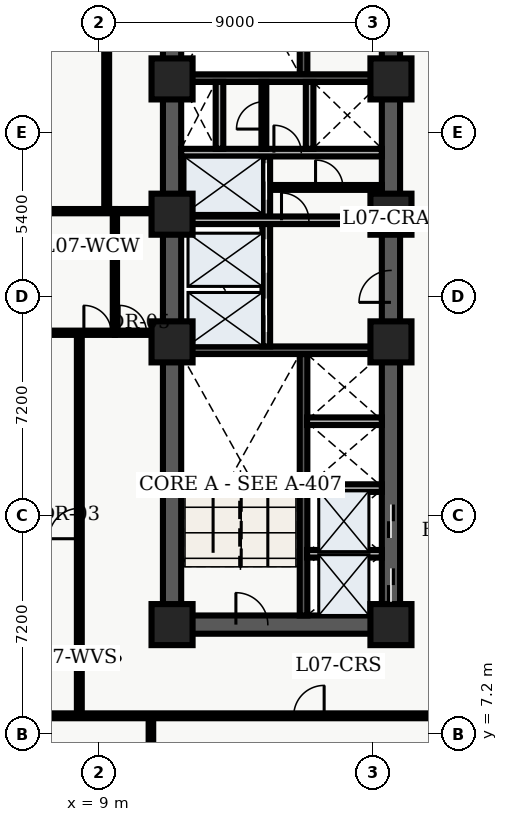
"""IFC4 building model, lengths in metres.
Left out: names, types, materials, properties, quantities, classifications, styles, units other than length and angle.
Written with IfcOpenShell. Run it as: python <this file> out.ifc"""

import sys

from ifc_helpers import new_model, entity, si_unit, converted_unit, direction, frame, origin_with_axes, origin_2d_with_axis, place, context, subcontext, project, spatial, polyline, rectangle, outline, extrude, element, fill, save


model = new_model("IFC4")
c1 = context("Model", 3, precision=1e-05, world=origin_with_axes(), true_north=direction((0.0, 1.0)))
c2 = subcontext(c1, "Body", "Model", "MODEL_VIEW")
j1 = project(units=[si_unit("LENGTHUNIT", "METRE"), converted_unit("PLANEANGLEUNIT", "DEGREE", entity("IfcPlaneAngleMeasure", 0.017), si_unit("PLANEANGLEUNIT", "RADIAN"), dimensions=[0, 0, 0, 0, 0, 0, 0])], contexts=[c1])
p1 = place(None, origin_with_axes())
s1 = spatial("IfcSite", under=j1, at=p1, CompositionType="ELEMENT")
p2 = place(p1, origin_with_axes())
s2 = spatial("IfcBuilding", under=s1, at=p2, CompositionType="ELEMENT")
p3 = place(p2, frame((0.0, 0.0, 32.7), z_axis=(0.0, 0.0, 1.0), x_axis=(1.0, 0.0, 0.0)))
s3 = spatial("IfcBuildingStorey", under=s2, at=p3, CompositionType="ELEMENT", Elevation=32.7)
p4 = place(p3, frame((11.4, 10.8, 0.0), z_axis=(0.0, 0.0, 1.0), x_axis=(0.0, 1.0, 0.0)))
e1 = element("IfcWall", 1, at=p4, inside=s3, PredefinedType="SHEAR", context=c2, shape_type="SweptSolid", body=[
    extrude(outline(polyline([(0.0, -0.3), (27.0, -0.3), (27.0, 0.3), (0.0, 0.3), (0.0, -0.3)])), origin_with_axes(), (0.0, 0.0, 1.0), 3.66),
])
p5 = place(p3, frame((11.4, 10.8, 0.0), z_axis=(0.0, 0.0, 1.0), x_axis=(1.0, 0.0, 0.0)))
e2 = element("IfcWall", 2, at=p5, inside=s3, PredefinedType="SHEAR", context=c2, shape_type="SweptSolid", body=[
    extrude(outline(polyline([(0.0, -0.3), (7.2, -0.3), (7.2, 0.3), (0.0, 0.3), (0.0, -0.3)])), origin_with_axes(), (0.0, 0.0, 1.0), 3.66),
])
p6 = place(p5, frame((2.625, 0.0, 0.0), z_axis=(0.0, 0.0, 1.0), x_axis=(1.0, 0.0, 0.0)))
e3 = element("IfcOpeningElement", 3, at=p6, cuts=e2, PredefinedType="OPENING", context=c2, shape_type="SweptSolid", body=[
    extrude(rectangle(XDim=1.05, YDim=0.62, at=origin_2d_with_axis()), origin_with_axes(), (0.0, 0.0, 1.0), 2.15),
])
p7 = place(p3, frame((18.6, 10.8, 0.0), z_axis=(0.0, 0.0, 1.0), x_axis=(0.0, 1.0, 0.0)))
e4 = element("IfcWall", 4, at=p7, inside=s3, PredefinedType="SHEAR", context=c2, shape_type="SweptSolid", body=[
    extrude(outline(polyline([(0.0, -0.3), (13.5, -0.3), (13.5, 0.3), (0.0, 0.3), (0.0, -0.3)])), origin_with_axes(), (0.0, 0.0, 1.0), 3.66),
])
p8 = place(p7, frame((1.3, 0.0, 0.0), z_axis=(0.0, 0.0, 1.0), x_axis=(1.0, 0.0, 0.0)))
e5 = element("IfcOpeningElement", 5, at=p8, cuts=e4, PredefinedType="OPENING", context=c2, shape_type="SweptSolid", body=[
    extrude(rectangle(XDim=1.1, YDim=0.62, at=origin_2d_with_axis()), origin_with_axes(), (0.0, 0.0, 1.0), 2.15),
])
p9 = place(p7, frame((3.4, 0.0, 0.0), z_axis=(0.0, 0.0, 1.0), x_axis=(1.0, 0.0, 0.0)))
e6 = element("IfcOpeningElement", 6, at=p9, cuts=e4, PredefinedType="OPENING", context=c2, shape_type="SweptSolid", body=[
    extrude(rectangle(XDim=1.1, YDim=0.62, at=origin_2d_with_axis()), origin_with_axes(), (0.0, 0.0, 1.0), 2.15),
])
p10 = place(p7, frame((11.125, 0.0, 0.0), z_axis=(0.0, 0.0, 1.0), x_axis=(1.0, 0.0, 0.0)))
e7 = element("IfcOpeningElement", 7, at=p10, cuts=e4, PredefinedType="OPENING", context=c2, shape_type="SweptSolid", body=[
    extrude(rectangle(XDim=1.05, YDim=0.62, at=origin_2d_with_axis()), origin_with_axes(), (0.0, 0.0, 1.0), 2.15),
])
p11 = place(p3, frame((18.6, 24.3, 0.0), z_axis=(0.0, 0.0, 1.0), x_axis=(0.0, 1.0, 0.0)))
e8 = element("IfcWall", 8, at=p11, inside=s3, PredefinedType="SHEAR", context=c2, shape_type="SweptSolid", body=[
    extrude(outline(polyline([(0.0, -0.3), (13.5, -0.3), (13.5, 0.3), (0.0, 0.3), (0.0, -0.3)])), origin_with_axes(), (0.0, 0.0, 1.0), 3.66),
])
p12 = place(p11, frame((6.025, 0.0, 0.0), z_axis=(0.0, 0.0, 1.0), x_axis=(1.0, 0.0, 0.0)))
e9 = element("IfcOpeningElement", 9, at=p12, cuts=e8, PredefinedType="OPENING", context=c2, shape_type="SweptSolid", body=[
    extrude(rectangle(XDim=0.95, YDim=0.62, at=origin_2d_with_axis()), origin_with_axes(), (0.0, 0.0, 1.0), 2.15),
])
p13 = place(p11, frame((7.825, 0.0, 0.0), z_axis=(0.0, 0.0, 1.0), x_axis=(1.0, 0.0, 0.0)))
e10 = element("IfcOpeningElement", 10, at=p13, cuts=e8, PredefinedType="OPENING", context=c2, shape_type="SweptSolid", body=[
    extrude(rectangle(XDim=0.95, YDim=0.62, at=origin_2d_with_axis()), origin_with_axes(), (0.0, 0.0, 1.0), 2.15),
])
p14 = place(p3, frame((15.725, 11.1, 0.0), z_axis=(0.0, 0.0, 1.0), x_axis=(0.0, 1.0, 0.0)))
e11 = element("IfcWall", 11, at=p14, inside=s3, PredefinedType="SHEAR", context=c2, shape_type="SweptSolid", body=[
    extrude(outline(polyline([(0.0, -0.125), (8.6, -0.125), (8.6, 0.125), (0.0, 0.125), (0.0, -0.125)])), origin_with_axes(), (0.0, 0.0, 1.0), 3.66),
])
p15 = place(p3, frame((11.7, 19.825, 0.0), z_axis=(0.0, 0.0, 1.0), x_axis=(1.0, 0.0, 0.0)))
e12 = element("IfcWall", 12, at=p15, inside=s3, PredefinedType="SHEAR", context=c2, shape_type="SweptSolid", body=[
    extrude(outline(polyline([(0.0, -0.125), (6.6, -0.125), (6.6, 0.125), (0.0, 0.125), (0.0, -0.125)])), origin_with_axes(), (0.0, 0.0, 1.0), 3.66),
])
p16 = place(p3, frame((15.725, 28.9, 0.0), z_axis=(0.0, 0.0, 1.0), x_axis=(0.0, 1.0, 0.0)))
e13 = element("IfcWall", 13, at=p16, inside=s3, PredefinedType="SHEAR", context=c2, shape_type="SweptSolid", body=[
    extrude(outline(polyline([(0.0, -0.125), (8.6, -0.125), (8.6, 0.125), (0.0, 0.125), (0.0, -0.125)])), origin_with_axes(), (0.0, 0.0, 1.0), 3.66),
])
p17 = place(p3, frame((11.7, 28.775, 0.0), z_axis=(0.0, 0.0, 1.0), x_axis=(1.0, 0.0, 0.0)))
e14 = element("IfcWall", 14, at=p17, inside=s3, PredefinedType="SHEAR", context=c2, shape_type="SweptSolid", body=[
    extrude(outline(polyline([(0.0, -0.125), (6.6, -0.125), (6.6, 0.125), (0.0, 0.125), (0.0, -0.125)])), origin_with_axes(), (0.0, 0.0, 1.0), 3.66),
])
p18 = place(p3, frame((14.5, 19.95, 0.0), z_axis=(0.0, 0.0, 1.0), x_axis=(0.0, 1.0, 0.0)))
e15 = element("IfcWall", 15, at=p18, inside=s3, PredefinedType="SOLIDWALL", context=c2, shape_type="SweptSolid", body=[
    extrude(outline(polyline([(0.0, -0.125), (6.25, -0.125), (6.25, 0.125), (0.0, 0.125), (0.0, -0.125)])), origin_with_axes(), (0.0, 0.0, 1.0), 2.7),
])
p19 = place(p18, frame((1.025, 0.0, 0.0), z_axis=(0.0, 0.0, 1.0), x_axis=(1.0, 0.0, 0.0)))
e16 = element("IfcOpeningElement", 16, at=p19, cuts=e15, PredefinedType="OPENING", context=c2, shape_type="SweptSolid", body=[
    extrude(rectangle(XDim=1.1, YDim=0.27, at=origin_2d_with_axis()), origin_with_axes(), (0.0, 0.0, 1.0), 2.15),
])
p20 = place(p18, frame((2.975, 0.0, 0.0), z_axis=(0.0, 0.0, 1.0), x_axis=(1.0, 0.0, 0.0)))
e17 = element("IfcOpeningElement", 17, at=p20, cuts=e15, PredefinedType="OPENING", context=c2, shape_type="SweptSolid", body=[
    extrude(rectangle(XDim=1.1, YDim=0.27, at=origin_2d_with_axis()), origin_with_axes(), (0.0, 0.0, 1.0), 2.15),
])
p21 = place(p18, frame((5.425, 0.0, 0.0), z_axis=(0.0, 0.0, 1.0), x_axis=(1.0, 0.0, 0.0)))
e18 = element("IfcOpeningElement", 18, at=p21, cuts=e15, PredefinedType="OPENING", context=c2, shape_type="SweptSolid", body=[
    extrude(rectangle(XDim=1.2, YDim=0.27, at=origin_2d_with_axis()), origin_with_axes(), (0.0, 0.0, 1.0), 2.15),
])
p22 = place(p3, frame((11.7, 24.1, 0.0), z_axis=(0.0, 0.0, 1.0), x_axis=(1.0, 0.0, 0.0)))
e19 = element("IfcWall", 19, at=p22, inside=s3, PredefinedType="SOLIDWALL", context=c2, shape_type="SweptSolid", body=[
    extrude(outline(polyline([(0.0, -0.125), (6.6, -0.125), (6.6, 0.125), (0.0, 0.125), (0.0, -0.125)])), origin_with_axes(), (0.0, 0.0, 1.0), 2.7),
])
p23 = place(p22, frame((3.75, 0.0, 0.0), z_axis=(0.0, 0.0, 1.0), x_axis=(1.0, 0.0, 0.0)))
e20 = element("IfcOpeningElement", 20, at=p23, cuts=e19, PredefinedType="OPENING", context=c2, shape_type="SweptSolid", body=[
    extrude(rectangle(XDim=0.9, YDim=0.27, at=origin_2d_with_axis()), origin_with_axes(), (0.0, 0.0, 1.0), 2.15),
])
p24 = place(p3, frame((11.7, 26.325, 0.0), z_axis=(0.0, 0.0, 1.0), x_axis=(1.0, 0.0, 0.0)))
e21 = element("IfcWall", 21, at=p24, inside=s3, PredefinedType="SOLIDWALL", context=c2, shape_type="SweptSolid", body=[
    extrude(outline(polyline([(0.0, -0.125), (6.6, -0.125), (6.6, 0.125), (0.0, 0.125), (0.0, -0.125)])), origin_with_axes(), (0.0, 0.0, 1.0), 2.7),
])
p25 = place(p24, frame((3.5, 0.0, 0.0), z_axis=(0.0, 0.0, 1.0), x_axis=(1.0, 0.0, 0.0)))
e22 = element("IfcOpeningElement", 22, at=p25, cuts=e21, PredefinedType="OPENING", context=c2, shape_type="SweptSolid", body=[
    extrude(rectangle(XDim=0.9, YDim=0.27, at=origin_2d_with_axis()), origin_with_axes(), (0.0, 0.0, 1.0), 2.15),
])
for number, where, z_axis, x_axis in (
    (23, (12.96, 26.45, 0.0), (0.0, 0.0, 1.0), (0.0, 1.0, 0.0)),
    (24, (15.925, 26.45, 0.0), (0.0, 0.0, 1.0), (0.0, 1.0, 0.0)),
):
    element("IfcWall", number, at=place(p3, frame(where, z_axis=z_axis, x_axis=x_axis)), inside=s3, PredefinedType="SOLIDWALL", context=c2, shape_type="SweptSolid", body=[
        extrude(outline(polyline([(0.0, -0.125), (2.2, -0.125), (2.2, 0.125), (0.0, 0.125), (0.0, -0.125)])), origin_with_axes(), (0.0, 0.0, 1.0), 2.7),
    ])
for number, where, z_axis, x_axis in (
    (25, (11.4, 10.8, 0.0), (0.0, 0.0, 1.0), (1.0, 0.0, 0.0)),
    (26, (11.4, 20.1, 0.0), (0.0, 0.0, 1.0), (1.0, 0.0, 0.0)),
    (27, (11.4, 24.3, 0.0), (0.0, 0.0, 1.0), (1.0, 0.0, 0.0)),
    (28, (11.4, 28.75, 0.0), (0.0, 0.0, 1.0), (1.0, 0.0, 0.0)),
    (29, (18.6, 10.8, 0.0), (0.0, 0.0, 1.0), (1.0, 0.0, 0.0)),
    (30, (18.6, 20.1, 0.0), (0.0, 0.0, 1.0), (1.0, 0.0, 0.0)),
    (31, (18.6, 24.3, 0.0), (0.0, 0.0, 1.0), (1.0, 0.0, 0.0)),
    (32, (18.6, 28.75, 0.0), (0.0, 0.0, 1.0), (1.0, 0.0, 0.0)),
):
    element("IfcColumn", number, at=place(p3, frame(where, z_axis=z_axis, x_axis=x_axis)), inside=s3, PredefinedType="COLUMN", context=c2, shape_type="SweptSolid", body=[
        extrude(rectangle(XDim=1.35, YDim=1.35, at=origin_2d_with_axis()), origin_with_axes(), (0.0, 0.0, 1.0), 3.9),
    ])
p26 = place(p3, frame((14.62, 25.18, 0.0), z_axis=(0.0, 0.0, 1.0), x_axis=(1.0, 0.0, 0.0)))
e33 = element("IfcWall", 33, at=p26, inside=s3, PredefinedType="PARTITIONING", context=c2, shape_type="SweptSolid", body=[
    extrude(outline(polyline([(0.0, -0.08), (3.68, -0.08), (3.68, 0.08), (0.0, 0.08), (0.0, -0.08)])), origin_with_axes(), (0.0, 0.0, 1.0), 2.7),
])
p27 = place(p26, frame((1.95, 0.0, 0.0), z_axis=(0.0, 0.0, 1.0), x_axis=(1.0, 0.0, 0.0)))
e34 = element("IfcOpeningElement", 34, at=p27, cuts=e33, PredefinedType="OPENING", context=c2, shape_type="SweptSolid", body=[
    extrude(rectangle(XDim=0.9, YDim=0.18, at=origin_2d_with_axis()), origin_with_axes(), (0.0, 0.0, 1.0), 2.15),
])
p28 = place(p3, frame((14.42, 26.45, 0.0), z_axis=(0.0, 0.0, 1.0), x_axis=(0.0, 1.0, 0.0)))
e35 = element("IfcWall", 35, at=p28, inside=s3, PredefinedType="PARTITIONING", context=c2, shape_type="SweptSolid", body=[
    extrude(outline(polyline([(0.0, -0.08), (2.2, -0.08), (2.2, 0.08), (0.0, 0.08), (0.0, -0.08)])), origin_with_axes(), (0.0, 0.0, 1.0), 2.7),
])
p29 = place(p28, frame((1.1, 0.0, 0.0), z_axis=(0.0, 0.0, 1.0), x_axis=(1.0, 0.0, 0.0)))
e36 = element("IfcOpeningElement", 36, at=p29, cuts=e35, PredefinedType="OPENING", context=c2, shape_type="SweptSolid", body=[
    extrude(rectangle(XDim=0.9, YDim=0.18, at=origin_2d_with_axis()), origin_with_axes(), (0.0, 0.0, 1.0), 2.15),
])
for number, where, z_axis, x_axis in (
    (37, (15.84, 13.13, 0.0), (0.0, 0.0, 1.0), (1.0, 0.0, 0.0)),
    (38, (15.84, 15.29, 0.0), (0.0, 0.0, 1.0), (1.0, 0.0, 0.0)),
    (39, (15.84, 17.49, 0.0), (0.0, 0.0, 1.0), (1.0, 0.0, 0.0)),
):
    element("IfcWall", number, at=place(p3, frame(where, z_axis=z_axis, x_axis=x_axis)), inside=s3, PredefinedType="SOLIDWALL", context=c2, shape_type="SweptSolid", body=[
        extrude(outline(polyline([(0.0, -0.125), (2.46, -0.125), (2.46, 0.125), (0.0, 0.125), (0.0, -0.125)])), origin_with_axes(), (0.0, 0.0, 1.0), 2.7),
    ])
p30 = place(p3, frame((9.52, 20.4, 0.0), z_axis=(0.0, 0.0, 1.0), x_axis=(0.0, 1.0, 0.0)))
e40 = element("IfcWall", 40, at=p30, inside=s3, PredefinedType="PARTITIONING", context=c2, shape_type="SweptSolid", body=[
    extrude(outline(polyline([(0.0, -0.07), (4.0, -0.07), (4.0, 0.07), (0.0, 0.07), (0.0, -0.07)])), origin_with_axes(), (0.0, 0.0, 1.0), 2.7),
])
p31 = place(p3, frame((9.52, 20.4, 0.0), z_axis=(0.0, 0.0, 1.0), x_axis=(1.0, 0.0, 0.0)))
e41 = element("IfcWall", 41, at=p31, inside=s3, PredefinedType="PARTITIONING", context=c2, shape_type="SweptSolid", body=[
    extrude(outline(polyline([(0.0, -0.07), (1.58, -0.07), (1.58, 0.07), (0.0, 0.07), (0.0, -0.07)])), origin_with_axes(), (0.0, 0.0, 1.0), 2.7),
])
p32 = place(p31, frame((0.59, 0.0, 0.0), z_axis=(0.0, 0.0, 1.0), x_axis=(1.0, 0.0, 0.0)))
e42 = element("IfcOpeningElement", 42, at=p32, cuts=e41, PredefinedType="OPENING", context=c2, shape_type="SweptSolid", body=[
    extrude(rectangle(XDim=0.9, YDim=0.16, at=origin_2d_with_axis()), origin_with_axes(), (0.0, 0.0, 1.0), 2.15),
])
p33 = place(p3, frame((9.52, 24.4, 0.0), z_axis=(0.0, 0.0, 1.0), x_axis=(1.0, 0.0, 0.0)))
e43 = element("IfcWall", 43, at=p33, inside=s3, PredefinedType="PARTITIONING", context=c2, shape_type="SweptSolid", body=[
    extrude(outline(polyline([(0.0, -0.07), (1.58, -0.07), (1.58, 0.07), (0.0, 0.07), (0.0, -0.07)])), origin_with_axes(), (0.0, 0.0, 1.0), 2.7),
])
p34 = place(p3, frame((2.6, 7.8, 0.0), z_axis=(0.0, 0.0, 1.0), x_axis=(1.0, 0.0, 0.0)))
e44 = element("IfcWall", 44, at=p34, inside=s3, PredefinedType="PARTITIONING", context=c2, shape_type="SweptSolid", body=[
    extrude(outline(polyline([(0.0, -0.08), (18.55, -0.08), (18.55, 0.08), (0.0, 0.08), (0.0, -0.08)])), origin_with_axes(), (0.0, 0.0, 1.0), 2.7),
])
p35 = place(p34, frame((3.768, 0.0, 0.0), z_axis=(0.0, 0.0, 1.0), x_axis=(1.0, 0.0, 0.0)))
e45 = element("IfcOpeningElement", 45, at=p35, cuts=e44, PredefinedType="OPENING", context=c2, shape_type="SweptSolid", body=[
    extrude(rectangle(XDim=1.0, YDim=0.18, at=origin_2d_with_axis()), origin_with_axes(), (0.0, 0.0, 1.0), 2.15),
])
p36 = place(p34, frame((13.303, 0.0, 0.0), z_axis=(0.0, 0.0, 1.0), x_axis=(1.0, 0.0, 0.0)))
e46 = element("IfcOpeningElement", 46, at=p36, cuts=e44, PredefinedType="OPENING", context=c2, shape_type="SweptSolid", body=[
    extrude(rectangle(XDim=1.0, YDim=0.18, at=origin_2d_with_axis()), origin_with_axes(), (0.0, 0.0, 1.0), 2.15),
])
p37 = place(p3, frame((8.35, 7.8, 0.0), z_axis=(0.0, 0.0, 1.0), x_axis=(0.0, 1.0, 0.0)))
e47 = element("IfcWall", 47, at=p37, inside=s3, PredefinedType="PARTITIONING", context=c2, shape_type="SweptSolid", body=[
    extrude(outline(polyline([(0.0, -0.08), (12.6, -0.08), (12.6, 0.08), (0.0, 0.08), (0.0, -0.08)])), origin_with_axes(), (0.0, 0.0, 1.0), 2.7),
])
p38 = place(p37, frame((6.325, 0.0, 0.0), z_axis=(0.0, 0.0, 1.0), x_axis=(1.0, 0.0, 0.0)))
e48 = element("IfcOpeningElement", 48, at=p38, cuts=e47, PredefinedType="OPENING", context=c2, shape_type="SweptSolid", body=[
    extrude(rectangle(XDim=1.0, YDim=0.18, at=origin_2d_with_axis()), origin_with_axes(), (0.0, 0.0, 1.0), 2.15),
])
p39 = place(p3, frame((9.25, 24.4, 0.0), z_axis=(0.0, 0.0, 1.0), x_axis=(0.0, 1.0, 0.0)))
e49 = element("IfcWall", 49, at=p39, inside=s3, PredefinedType="PARTITIONING", context=c2, shape_type="SweptSolid", body=[
    extrude(outline(polyline([(0.0, -0.08), (16.1, -0.08), (16.1, 0.08), (0.0, 0.08), (0.0, -0.08)])), origin_with_axes(), (0.0, 0.0, 1.0), 2.7),
])
p40 = place(p39, frame((5.853, 0.0, 0.0), z_axis=(0.0, 0.0, 1.0), x_axis=(1.0, 0.0, 0.0)))
e50 = element("IfcOpeningElement", 50, at=p40, cuts=e49, PredefinedType="OPENING", context=c2, shape_type="SweptSolid", body=[
    extrude(rectangle(XDim=1.0, YDim=0.18, at=origin_2d_with_axis()), origin_with_axes(), (0.0, 0.0, 1.0), 2.15),
])
p41 = place(p39, frame((10.768, 0.0, 0.0), z_axis=(0.0, 0.0, 1.0), x_axis=(1.0, 0.0, 0.0)))
e51 = element("IfcOpeningElement", 51, at=p41, cuts=e49, PredefinedType="OPENING", context=c2, shape_type="SweptSolid", body=[
    extrude(rectangle(XDim=1.0, YDim=0.18, at=origin_2d_with_axis()), origin_with_axes(), (0.0, 0.0, 1.0), 2.15),
])
p42 = place(p3, frame((0.36, 20.4, 0.0), z_axis=(0.0, 0.0, 1.0), x_axis=(1.0, 0.0, 0.0)))
e52 = element("IfcWall", 52, at=p42, inside=s3, PredefinedType="PARTITIONING", context=c2, shape_type="SweptSolid", body=[
    extrude(outline(polyline([(0.0, -0.07), (9.16, -0.07), (9.16, 0.07), (0.0, 0.07), (0.0, -0.07)])), origin_with_axes(), (0.0, 0.0, 1.0), 2.7),
])
p43 = place(p42, frame((8.59, 0.0, 0.0), z_axis=(0.0, 0.0, 1.0), x_axis=(1.0, 0.0, 0.0)))
e53 = element("IfcOpeningElement", 53, at=p43, cuts=e52, PredefinedType="OPENING", context=c2, shape_type="SweptSolid", body=[
    extrude(rectangle(XDim=0.9, YDim=0.16, at=origin_2d_with_axis()), origin_with_axes(), (0.0, 0.0, 1.0), 2.15),
])
p44 = place(p3, frame((0.36, 24.4, 0.0), z_axis=(0.0, 0.0, 1.0), x_axis=(1.0, 0.0, 0.0)))
e54 = element("IfcWall", 54, at=p44, inside=s3, PredefinedType="PARTITIONING", context=c2, shape_type="SweptSolid", body=[
    extrude(outline(polyline([(0.0, -0.07), (9.16, -0.07), (9.16, 0.07), (0.0, 0.07), (0.0, -0.07)])), origin_with_axes(), (0.0, 0.0, 1.0), 2.7),
])
p45 = place(p3, frame((10.705, 0.36, 0.0), z_axis=(0.0, 0.0, 1.0), x_axis=(0.0, 1.0, 0.0)))
e55 = element("IfcWall", 55, at=p45, inside=s3, PredefinedType="PARTITIONING", context=c2, shape_type="SweptSolid", body=[
    extrude(outline(polyline([(0.0, -0.075), (7.34, -0.075), (7.34, 0.075), (0.0, 0.075), (0.0, -0.075)])), origin_with_axes(), (0.0, 0.0, 1.0), 2.7),
])
p46 = place(p7, frame((1.3, 0.0, 0.0), z_axis=(0.0, 0.0, 1.0), x_axis=(1.0, 0.0, 0.0)))
e56 = element("IfcDoor", 56, at=p46, inside=s3, OperationType="SLIDING_TO_LEFT", PredefinedType="DOOR", context=c2, shape_type="SweptSolid", body=[
    extrude(rectangle(XDim=1.1, YDim=0.09, at=origin_2d_with_axis()), origin_with_axes(), (0.0, 0.0, 1.0), 2.15),
])
fill(e5, e56)
p47 = place(p7, frame((3.4, 0.0, 0.0), z_axis=(0.0, 0.0, 1.0), x_axis=(1.0, 0.0, 0.0)))
e57 = element("IfcDoor", 57, at=p47, inside=s3, OperationType="SLIDING_TO_RIGHT", PredefinedType="DOOR", context=c2, shape_type="SweptSolid", body=[
    extrude(rectangle(XDim=1.1, YDim=0.09, at=origin_2d_with_axis()), origin_with_axes(), (0.0, 0.0, 1.0), 2.15),
])
fill(e6, e57)
p48 = place(p18, frame((1.025, 0.0, 0.0), z_axis=(0.0, 0.0, 1.0), x_axis=(1.0, 0.0, 0.0)))
e58 = element("IfcDoor", 58, at=p48, inside=s3, OperationType="SLIDING_TO_LEFT", PredefinedType="DOOR", context=c2, shape_type="SweptSolid", body=[
    extrude(rectangle(XDim=1.1, YDim=0.09, at=origin_2d_with_axis()), origin_with_axes(), (0.0, 0.0, 1.0), 2.15),
])
fill(e16, e58)
p49 = place(p18, frame((2.975, 0.0, 0.0), z_axis=(0.0, 0.0, 1.0), x_axis=(1.0, 0.0, 0.0)))
e59 = element("IfcDoor", 59, at=p49, inside=s3, OperationType="SLIDING_TO_RIGHT", PredefinedType="DOOR", context=c2, shape_type="SweptSolid", body=[
    extrude(rectangle(XDim=1.1, YDim=0.09, at=origin_2d_with_axis()), origin_with_axes(), (0.0, 0.0, 1.0), 2.15),
])
fill(e17, e59)
p50 = place(p18, frame((5.425, 0.0, 0.0), z_axis=(0.0, 0.0, 1.0), x_axis=(1.0, 0.0, 0.0)))
e60 = element("IfcDoor", 60, at=p50, inside=s3, OperationType="DOUBLE_DOOR_SLIDING", PredefinedType="DOOR", context=c2, shape_type="SweptSolid", body=[
    extrude(rectangle(XDim=1.2, YDim=0.09, at=origin_2d_with_axis()), origin_with_axes(), (0.0, 0.0, 1.0), 2.15),
])
fill(e18, e60)
p51 = place(p5, frame((2.625, 0.0, 0.0), z_axis=(0.0, 0.0, 1.0), x_axis=(1.0, 0.0, 0.0)))
e61 = element("IfcDoor", 61, at=p51, inside=s3, OperationType="SINGLE_SWING_LEFT", PredefinedType="DOOR", context=c2, shape_type="SweptSolid", body=[
    extrude(rectangle(XDim=1.05, YDim=0.09, at=origin_2d_with_axis()), origin_with_axes(), (0.0, 0.0, 1.0), 2.15),
])
fill(e3, e61)
p52 = place(p7, frame((11.125, 0.0, 0.0), z_axis=(0.0, 0.0, 1.0), x_axis=(1.0, 0.0, 0.0)))
e62 = element("IfcDoor", 62, at=p52, inside=s3, OperationType="SINGLE_SWING_LEFT", PredefinedType="DOOR", context=c2, shape_type="SweptSolid", body=[
    extrude(rectangle(XDim=1.05, YDim=0.09, at=origin_2d_with_axis()), origin_with_axes(), (0.0, 0.0, 1.0), 2.15),
])
fill(e7, e62)
p53 = place(p24, frame((3.5, 0.0, 0.0), z_axis=(0.0, 0.0, 1.0), x_axis=(1.0, 0.0, 0.0)))
e63 = element("IfcDoor", 63, at=p53, inside=s3, OperationType="SINGLE_SWING_LEFT", PredefinedType="DOOR", context=c2, shape_type="SweptSolid", body=[
    extrude(rectangle(XDim=0.9, YDim=0.09, at=origin_2d_with_axis()), origin_with_axes(), (0.0, 0.0, 1.0), 2.15),
])
fill(e22, e63)
p54 = place(p28, frame((1.1, 0.0, 0.0), z_axis=(0.0, 0.0, 1.0), x_axis=(1.0, 0.0, 0.0)))
e64 = element("IfcDoor", 64, at=p54, inside=s3, OperationType="SINGLE_SWING_LEFT", PredefinedType="DOOR", context=c2, shape_type="SweptSolid", body=[
    extrude(rectangle(XDim=0.9, YDim=0.09, at=origin_2d_with_axis()), origin_with_axes(), (0.0, 0.0, 1.0), 2.15),
])
fill(e36, e64)
p55 = place(p22, frame((3.75, 0.0, 0.0), z_axis=(0.0, 0.0, 1.0), x_axis=(1.0, 0.0, 0.0)))
e65 = element("IfcDoor", 65, at=p55, inside=s3, OperationType="SINGLE_SWING_LEFT", PredefinedType="DOOR", context=c2, shape_type="SweptSolid", body=[
    extrude(rectangle(XDim=0.9, YDim=0.09, at=origin_2d_with_axis()), origin_with_axes(), (0.0, 0.0, 1.0), 2.15),
])
fill(e20, e65)
p56 = place(p26, frame((1.95, 0.0, 0.0), z_axis=(0.0, 0.0, 1.0), x_axis=(1.0, 0.0, 0.0)))
e66 = element("IfcDoor", 66, at=p56, inside=s3, OperationType="SINGLE_SWING_LEFT", PredefinedType="DOOR", context=c2, shape_type="SweptSolid", body=[
    extrude(rectangle(XDim=0.9, YDim=0.09, at=origin_2d_with_axis()), origin_with_axes(), (0.0, 0.0, 1.0), 2.15),
])
fill(e34, e66)
p57 = place(p31, frame((0.59, 0.0, 0.0), z_axis=(0.0, 0.0, 1.0), x_axis=(1.0, 0.0, 0.0)))
e67 = element("IfcDoor", 67, at=p57, inside=s3, OperationType="SINGLE_SWING_LEFT", PredefinedType="DOOR", context=c2, shape_type="SweptSolid", body=[
    extrude(rectangle(XDim=0.9, YDim=0.084, at=origin_2d_with_axis()), origin_with_axes(), (0.0, 0.0, 1.0), 2.15),
])
fill(e42, e67)
p58 = place(p42, frame((8.59, 0.0, 0.0), z_axis=(0.0, 0.0, 1.0), x_axis=(1.0, 0.0, 0.0)))
e68 = element("IfcDoor", 68, at=p58, inside=s3, OperationType="SINGLE_SWING_LEFT", PredefinedType="DOOR", context=c2, shape_type="SweptSolid", body=[
    extrude(rectangle(XDim=0.9, YDim=0.084, at=origin_2d_with_axis()), origin_with_axes(), (0.0, 0.0, 1.0), 2.15),
])
fill(e53, e68)
p59 = place(p37, frame((6.325, 0.0, 0.0), z_axis=(0.0, 0.0, 1.0), x_axis=(1.0, 0.0, 0.0)))
e69 = element("IfcDoor", 69, at=p59, inside=s3, OperationType="SINGLE_SWING_LEFT", PredefinedType="DOOR", context=c2, shape_type="SweptSolid", body=[
    extrude(rectangle(XDim=1.0, YDim=0.09, at=origin_2d_with_axis()), origin_with_axes(), (0.0, 0.0, 1.0), 2.15),
])
fill(e48, e69)
p60 = place(p34, frame((13.303, 0.0, 0.0), z_axis=(0.0, 0.0, 1.0), x_axis=(1.0, 0.0, 0.0)))
e70 = element("IfcDoor", 70, at=p60, inside=s3, OperationType="SINGLE_SWING_RIGHT", PredefinedType="DOOR", context=c2, shape_type="SweptSolid", body=[
    extrude(rectangle(XDim=1.0, YDim=0.09, at=origin_2d_with_axis()), origin_with_axes(), (0.0, 0.0, 1.0), 2.15),
])
fill(e46, e70)
save(model, sys.argv[1])
